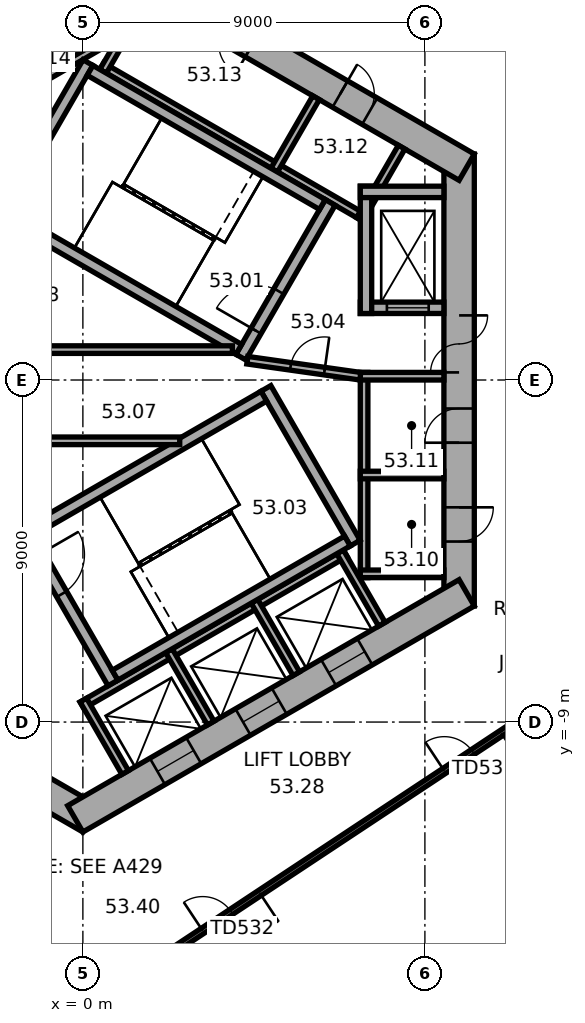
"""IFC4 building model, lengths in metres.
Left out: names, types, materials, properties, quantities, classifications, styles, units other than length and angle.
Written with IfcOpenShell. Run it as: python <this file> out.ifc"""

import sys

from ifc_helpers import new_model, si_unit, direction, frame, frame_2d, origin, place, context, subcontext, project, spatial, rectangle, extrude, element, fill, save


model = new_model("IFC4")
c1 = context("Model", 3, precision=1e-05, world=origin(), true_north=direction((0.0, 1.0)))
c2 = subcontext(c1, "Body", "Model", "MODEL_VIEW")
j1 = project(units=[si_unit("LENGTHUNIT", "METRE"), si_unit("PLANEANGLEUNIT", "RADIAN")], contexts=[c1])
p1 = place(None, origin())
s1 = spatial("IfcSite", under=j1, at=p1, CompositionType="ELEMENT")
p2 = place(p1, origin())
s2 = spatial("IfcBuilding", under=s1, at=p2, CompositionType="ELEMENT")
p3 = place(p2, frame((0.0, 0.0, 214.3)))
s3 = spatial("IfcBuildingStorey", under=s2, at=p3, CompositionType="ELEMENT", Elevation=214.3)
p4 = place(p3, frame((9.9, -5.947, 0.0), z_axis=(0.0, 0.0, 1.0), x_axis=(0.0, 1.0, 0.0)))
e1 = element("IfcWall", 1, at=p4, inside=s3, PredefinedType="SHEAR", context=c2, shape_type="SweptSolid", body=[
    extrude(rectangle(XDim=11.894, YDim=0.8, at=frame_2d((5.947, 0.0))), origin(), (0.0, 0.0, 1.0), 7.4),
])
p5 = place(p4, frame((6.147, 0.0, 0.0)))
e2 = element("IfcOpeningElement", 2, at=p5, cuts=e1, PredefinedType="OPENING", context=c2, shape_type="SweptSolid", body=[
    extrude(rectangle(XDim=1.5, YDim=2.1, at=frame_2d((0.75, 1.05))), frame((0.0, 0.41, 0.0), z_axis=(0.0, -1.0, 0.0), x_axis=(1.0, 0.0, 0.0)), (0.0, 0.0, 1.0), 0.82),
])
p6 = place(p4, frame((1.697, 0.0, 0.0)))
e3 = element("IfcOpeningElement", 3, at=p6, cuts=e1, PredefinedType="OPENING", context=c2, shape_type="SweptSolid", body=[
    extrude(rectangle(XDim=0.9, YDim=2.1, at=frame_2d((0.45, 1.05))), frame((0.0, 0.41, 0.0), z_axis=(0.0, -1.0, 0.0), x_axis=(1.0, 0.0, 0.0)), (0.0, 0.0, 1.0), 0.82),
])
p7 = place(p4, frame((4.297, 0.0, 0.0)))
e4 = element("IfcOpeningElement", 4, at=p7, cuts=e1, PredefinedType="OPENING", context=c2, shape_type="SweptSolid", body=[
    extrude(rectangle(XDim=0.9, YDim=2.1, at=frame_2d((0.45, 1.05))), frame((0.0, 0.41, 0.0), z_axis=(0.0, -1.0, 0.0), x_axis=(1.0, 0.0, 0.0)), (0.0, 0.0, 1.0), 0.82),
])
p8 = place(p3, frame((10.1, 5.6, 0.0), z_axis=(0.0, 0.0, 1.0), x_axis=(-0.866023897231, 0.500002609418, 0.0)))
e5 = element("IfcWall", 5, at=p8, inside=s3, PredefinedType="SHEAR", context=c2, shape_type="SweptSolid", body=[
    extrude(rectangle(XDim=11.894, YDim=0.8, at=frame_2d((5.947, 0.0))), origin(), (0.0, 0.0, 1.0), 7.4),
])
p9 = place(p8, frame((2.947, 0.0, 0.0)))
e6 = element("IfcOpeningElement", 6, at=p9, cuts=e5, PredefinedType="OPENING", context=c2, shape_type="SweptSolid", body=[
    extrude(rectangle(XDim=0.9, YDim=2.1, at=frame_2d((0.45, 1.05))), frame((0.0, 0.41, 0.0), z_axis=(0.0, -1.0, 0.0), x_axis=(1.0, 0.0, 0.0)), (0.0, 0.0, 1.0), 0.82),
])
p10 = place(p8, frame((6.497, 0.0, 0.0)))
e7 = element("IfcOpeningElement", 7, at=p10, cuts=e5, PredefinedType="OPENING", context=c2, shape_type="SweptSolid", body=[
    extrude(rectangle(XDim=0.9, YDim=2.1, at=frame_2d((0.45, 1.05))), frame((0.0, 0.41, 0.0), z_axis=(0.0, -1.0, 0.0), x_axis=(1.0, 0.0, 0.0)), (0.0, 0.0, 1.0), 0.82),
])
p11 = place(p3, frame((0.2, 11.547, 0.0), z_axis=(0.0, 0.0, 1.0), x_axis=(-0.866023897231, -0.500002609418, 0.0)))
e8 = element("IfcWall", 8, at=p11, inside=s3, PredefinedType="SHEAR", context=c2, shape_type="SweptSolid", body=[
    extrude(rectangle(XDim=11.894, YDim=0.8, at=frame_2d((5.947, 0.0))), origin(), (0.0, 0.0, 1.0), 7.4),
])
p12 = place(p11, frame((6.147, 0.0, 0.0)))
e9 = element("IfcOpeningElement", 9, at=p12, cuts=e8, PredefinedType="OPENING", context=c2, shape_type="SweptSolid", body=[
    extrude(rectangle(XDim=1.5, YDim=2.1, at=frame_2d((0.75, 1.05))), frame((0.0, 0.41, 0.0), z_axis=(0.0, -1.0, 0.0), x_axis=(1.0, 0.0, 0.0)), (0.0, 0.0, 1.0), 0.82),
])
p13 = place(p11, frame((1.697, 0.0, 0.0)))
e10 = element("IfcOpeningElement", 10, at=p13, cuts=e8, PredefinedType="OPENING", context=c2, shape_type="SweptSolid", body=[
    extrude(rectangle(XDim=0.9, YDim=2.1, at=frame_2d((0.45, 1.05))), frame((0.0, 0.41, 0.0), z_axis=(0.0, -1.0, 0.0), x_axis=(1.0, 0.0, 0.0)), (0.0, 0.0, 1.0), 0.82),
])
p14 = place(p11, frame((4.297, 0.0, 0.0)))
e11 = element("IfcOpeningElement", 11, at=p14, cuts=e8, PredefinedType="OPENING", context=c2, shape_type="SweptSolid", body=[
    extrude(rectangle(XDim=0.9, YDim=2.1, at=frame_2d((0.45, 1.05))), frame((0.0, 0.41, 0.0), z_axis=(0.0, -1.0, 0.0), x_axis=(1.0, 0.0, 0.0)), (0.0, 0.0, 1.0), 0.82),
])
p15 = place(p3, frame((-10.1, -5.6, 0.0), z_axis=(0.0, 0.0, 1.0), x_axis=(0.866023897231, -0.500002609418, 0.0)))
e12 = element("IfcWall", 12, at=p15, inside=s3, PredefinedType="SHEAR", context=c2, shape_type="SweptSolid", body=[
    extrude(rectangle(XDim=11.894, YDim=0.8, at=frame_2d((5.947, 0.0))), origin(), (0.0, 0.0, 1.0), 7.4),
])
p16 = place(p15, frame((6.147, 0.0, 0.0)))
e13 = element("IfcOpeningElement", 13, at=p16, cuts=e12, PredefinedType="OPENING", context=c2, shape_type="SweptSolid", body=[
    extrude(rectangle(XDim=1.5, YDim=2.1, at=frame_2d((0.75, 1.05))), frame((0.0, 0.41, 0.0), z_axis=(0.0, -1.0, 0.0), x_axis=(1.0, 0.0, 0.0)), (0.0, 0.0, 1.0), 0.82),
])
p17 = place(p15, frame((1.597, 0.0, 0.0)))
e14 = element("IfcOpeningElement", 14, at=p17, cuts=e12, PredefinedType="OPENING", context=c2, shape_type="SweptSolid", body=[
    extrude(rectangle(XDim=1.1, YDim=2.1, at=frame_2d((0.55, 1.05))), frame((0.0, 0.41, 0.0), z_axis=(0.0, -1.0, 0.0), x_axis=(1.0, 0.0, 0.0)), (0.0, 0.0, 1.0), 0.82),
])
p18 = place(p15, frame((4.197, 0.0, 0.0)))
e15 = element("IfcOpeningElement", 15, at=p18, cuts=e12, PredefinedType="OPENING", context=c2, shape_type="SweptSolid", body=[
    extrude(rectangle(XDim=1.1, YDim=2.1, at=frame_2d((0.55, 1.05))), frame((0.0, 0.41, 0.0), z_axis=(0.0, -1.0, 0.0), x_axis=(1.0, 0.0, 0.0)), (0.0, 0.0, 1.0), 0.82),
])
p19 = place(p3, frame((-0.2, -11.547, 0.0), z_axis=(0.0, 0.0, 1.0), x_axis=(0.866023897231, 0.500002609418, 0.0)))
e16 = element("IfcWall", 16, at=p19, inside=s3, PredefinedType="SHEAR", context=c2, shape_type="SweptSolid", body=[
    extrude(rectangle(XDim=11.894, YDim=0.8, at=frame_2d((5.947, 0.0))), origin(), (0.0, 0.0, 1.0), 7.4),
])
p20 = place(p19, frame((2.497, 0.0, 0.0)))
e17 = element("IfcOpeningElement", 17, at=p20, cuts=e16, PredefinedType="OPENING", context=c2, shape_type="SweptSolid", body=[
    extrude(rectangle(XDim=1.1, YDim=2.1, at=frame_2d((0.55, 1.05))), frame((0.0, 0.41, 0.0), z_axis=(0.0, -1.0, 0.0), x_axis=(1.0, 0.0, 0.0)), (0.0, 0.0, 1.0), 0.82),
])
p21 = place(p19, frame((5.097, 0.0, 0.0)))
e18 = element("IfcOpeningElement", 18, at=p21, cuts=e16, PredefinedType="OPENING", context=c2, shape_type="SweptSolid", body=[
    extrude(rectangle(XDim=1.1, YDim=2.1, at=frame_2d((0.55, 1.05))), frame((0.0, 0.41, 0.0), z_axis=(0.0, -1.0, 0.0), x_axis=(1.0, 0.0, 0.0)), (0.0, 0.0, 1.0), 0.82),
])
p22 = place(p19, frame((7.697, 0.0, 0.0)))
e19 = element("IfcOpeningElement", 19, at=p22, cuts=e16, PredefinedType="OPENING", context=c2, shape_type="SweptSolid", body=[
    extrude(rectangle(XDim=1.1, YDim=2.1, at=frame_2d((0.55, 1.05))), frame((0.0, 0.41, 0.0), z_axis=(0.0, -1.0, 0.0), x_axis=(1.0, 0.0, 0.0)), (0.0, 0.0, 1.0), 0.82),
])
p23 = place(p3, frame((13.44, -7.683, 0.0), z_axis=(0.0, 0.0, 1.0), x_axis=(-0.833878347594, -0.551948277844, 0.0)))
e20 = element("IfcWall", 20, at=p23, inside=s3, PredefinedType="STANDARD", context=c2, shape_type="SweptSolid", body=[
    extrude(rectangle(XDim=15.249, YDim=0.15, at=frame_2d((7.625, 0.0))), origin(), (0.0, 0.0, 1.0), 2.6),
])
p24 = place(p23, frame((2.912, 0.0, 0.0)))
e21 = element("IfcOpeningElement", 21, at=p24, cuts=e20, PredefinedType="OPENING", context=c2, shape_type="SweptSolid", body=[
    extrude(rectangle(XDim=1.8, YDim=2.4, at=frame_2d((0.9, 1.2))), frame((0.0, 0.085, 0.0), z_axis=(0.0, -1.0, 0.0), x_axis=(1.0, 0.0, 0.0)), (0.0, 0.0, 1.0), 0.17),
])
p25 = place(p23, frame((10.537, 0.0, 0.0)))
e22 = element("IfcOpeningElement", 22, at=p25, cuts=e20, PredefinedType="OPENING", context=c2, shape_type="SweptSolid", body=[
    extrude(rectangle(XDim=1.8, YDim=2.4, at=frame_2d((0.9, 1.2))), frame((0.0, 0.085, 0.0), z_axis=(0.0, -1.0, 0.0), x_axis=(1.0, 0.0, 0.0)), (0.0, 0.0, 1.0), 0.17),
])
p26 = place(p3, frame((0.69, -16.171, 0.0), z_axis=(0.0, 0.0, 1.0), x_axis=(-0.871655280677, 0.490119446326, 0.0)))
e23 = element("IfcWall", 23, at=p26, inside=s3, PredefinedType="STANDARD", context=c2, shape_type="SweptSolid", body=[
    extrude(rectangle(XDim=14.552, YDim=0.15, at=frame_2d((7.276, 0.0))), origin(), (0.0, 0.0, 1.0), 2.6),
])
p27 = place(p26, frame((2.738, 0.0, 0.0)))
e24 = element("IfcOpeningElement", 24, at=p27, cuts=e23, PredefinedType="OPENING", context=c2, shape_type="SweptSolid", body=[
    extrude(rectangle(XDim=1.8, YDim=2.4, at=frame_2d((0.9, 1.2))), frame((0.0, 0.085, 0.0), z_axis=(0.0, -1.0, 0.0), x_axis=(1.0, 0.0, 0.0)), (0.0, 0.0, 1.0), 0.17),
])
p28 = place(p26, frame((10.014, 0.0, 0.0)))
e25 = element("IfcOpeningElement", 25, at=p28, cuts=e23, PredefinedType="OPENING", context=c2, shape_type="SweptSolid", body=[
    extrude(rectangle(XDim=1.8, YDim=2.4, at=frame_2d((0.9, 1.2))), frame((0.0, 0.085, 0.0), z_axis=(0.0, -1.0, 0.0), x_axis=(1.0, 0.0, 0.0)), (0.0, 0.0, 1.0), 0.17),
])
p29 = place(p3, frame((7.4, -5.2, 0.0), z_axis=(0.0, 0.0, 1.0), x_axis=(0.0, 1.0, 0.0)))
e26 = element("IfcWall", 26, at=p29, inside=s3, PredefinedType="PARTITIONING", context=c2, shape_type="SweptSolid", body=[
    extrude(rectangle(XDim=5.4, YDim=0.2, at=frame_2d((2.7, 0.0))), origin(), (0.0, 0.0, 1.0), 7.12),
])
for number, where, z_axis, x_axis in (
    (27, (7.3, -5.1, 0.0), (0.0, 0.0, 1.0), (1.0, 0.0, 0.0)),
    (28, (7.3, -2.5, 0.0), (0.0, 0.0, 1.0), (1.0, 0.0, 0.0)),
    (29, (7.3, 0.1, 0.0), (0.0, 0.0, 1.0), (1.0, 0.0, 0.0)),
):
    element("IfcWall", number, at=place(p3, frame(where, z_axis=z_axis, x_axis=x_axis)), inside=s3, PredefinedType="PARTITIONING", context=c2, shape_type="SweptSolid", body=[
        extrude(rectangle(XDim=2.2, YDim=0.2, at=frame_2d((1.1, 0.0))), origin(), (0.0, 0.0, 1.0), 7.12),
    ])
p30 = place(p3, frame((7.424, 4.259, 0.0), z_axis=(0.0, 0.0, 1.0), x_axis=(-0.866026010844, 0.49999894854, 0.0)))
e30 = element("IfcWall", 30, at=p30, inside=s3, PredefinedType="PARTITIONING", context=c2, shape_type="SweptSolid", body=[
    extrude(rectangle(XDim=8.0, YDim=0.2, at=frame_2d((4.0, 0.0))), origin(), (0.0, 0.0, 1.0), 7.12),
])
for number, where, z_axis, x_axis in (
    (31, (7.287, 4.222, 0.0), (0.0, 0.0, 1.0), (0.5, 0.866, 0.0)),
    (32, (5.036, 5.522, 0.0), (0.0, 0.0, 1.0), (0.5, 0.866, 0.0)),
    (33, (0.532, 8.122, 0.0), (0.0, 0.0, 1.0), (0.5, 0.866, 0.0)),
):
    element("IfcWall", number, at=place(p3, frame(where, z_axis=z_axis, x_axis=x_axis)), inside=s3, PredefinedType="PARTITIONING", context=c2, shape_type="SweptSolid", body=[
        extrude(rectangle(XDim=2.2, YDim=0.2, at=frame_2d((1.1, 0.0))), origin(), (0.0, 0.0, 1.0), 7.12),
    ])
p31 = place(p3, frame((0.803, 9.009, 0.0), z_axis=(0.0, 0.0, 1.0), x_axis=(-0.866028230842, -0.499995103361, 0.0)))
e34 = element("IfcWall", 34, at=p31, inside=s3, PredefinedType="PARTITIONING", context=c2, shape_type="SweptSolid", body=[
    extrude(rectangle(XDim=5.4, YDim=0.2, at=frame_2d((2.7, 0.0))), origin(), (0.0, 0.0, 1.0), 7.12),
])
p32 = place(p3, frame((-0.024, -8.559, 0.0), z_axis=(0.0, 0.0, 1.0), x_axis=(0.866026010844, 0.49999894854, 0.0)))
e35 = element("IfcWall", 35, at=p32, inside=s3, PredefinedType="PARTITIONING", context=c2, shape_type="SweptSolid", body=[
    extrude(rectangle(XDim=8.0, YDim=0.2, at=frame_2d((4.0, 0.0))), origin(), (0.0, 0.0, 1.0), 7.12),
])
for number, where, z_axis, x_axis in (
    (36, (0.013, -8.422, 0.0), (0.0, 0.0, 1.0), (0.5, -0.866, 0.0)),
    (37, (2.264, -7.122, 0.0), (0.0, 0.0, 1.0), (0.5, -0.866, 0.0)),
    (38, (4.516, -5.822, 0.0), (0.0, 0.0, 1.0), (0.5, -0.866, 0.0)),
    (39, (6.768, -4.522, 0.0), (0.0, 0.0, 1.0), (0.5, -0.866, 0.0)),
):
    element("IfcWall", number, at=place(p3, frame(where, z_axis=z_axis, x_axis=x_axis)), inside=s3, PredefinedType="PARTITIONING", context=c2, shape_type="SweptSolid", body=[
        extrude(rectangle(XDim=2.2, YDim=0.2, at=frame_2d((1.1, 0.0))), origin(), (0.0, 0.0, 1.0), 7.12),
    ])
p33 = place(p3, frame((4.158, 0.602, 0.0), z_axis=(0.0, 0.0, 1.0), x_axis=(0.499977259774, 0.866038532462, 0.0)))
e40 = element("IfcWall", 40, at=p33, inside=s3, PredefinedType="SHEAR", context=c2, shape_type="SweptSolid", body=[
    extrude(rectangle(XDim=4.7, YDim=0.3, at=frame_2d((2.35, 0.0))), origin(), (0.0, 0.0, 1.0), 7.12),
])
p34 = place(p33, frame((0.8, 0.0, 0.0)))
e41 = element("IfcOpeningElement", 41, at=p34, cuts=e40, PredefinedType="OPENING", context=c2, shape_type="SweptSolid", body=[
    extrude(rectangle(XDim=1.2, YDim=2.1, at=frame_2d((0.6, 1.05))), frame((0.0, 0.16, 0.0), z_axis=(0.0, -1.0, 0.0), x_axis=(1.0, 0.0, 0.0)), (0.0, 0.0, 1.0), 0.32),
])
p35 = place(p3, frame((-2.216, 4.282, 0.0), z_axis=(0.0, 0.0, 1.0), x_axis=(0.499977259774, 0.866038532462, 0.0)))
e42 = element("IfcWall", 42, at=p35, inside=s3, PredefinedType="SHEAR", context=c2, shape_type="SweptSolid", body=[
    extrude(rectangle(XDim=4.7, YDim=0.3, at=frame_2d((2.35, 0.0))), origin(), (0.0, 0.0, 1.0), 7.12),
])
for number, where, z_axis, x_axis in (
    (43, (4.103, 0.807, 0.0), (0.0, 0.0, 1.0), (-0.866, 0.5, 0.0)),
    (44, (6.303, 4.617, 0.0), (0.0, 0.0, 1.0), (-0.866, 0.5, 0.0)),
):
    element("IfcWall", number, at=place(p3, frame(where, z_axis=z_axis, x_axis=x_axis)), inside=s3, PredefinedType="SHEAR", context=c2, shape_type="SweptSolid", body=[
        extrude(rectangle(XDim=7.06, YDim=0.3, at=frame_2d((3.53, 0.0))), origin(), (0.0, 0.0, 1.0), 7.12),
    ])
p36 = place(p3, frame((-1.558, -3.902, 0.0), z_axis=(0.0, 0.0, 1.0), x_axis=(0.499977259774, -0.866038532462, 0.0)))
e45 = element("IfcWall", 45, at=p36, inside=s3, PredefinedType="SHEAR", context=c2, shape_type="SweptSolid", body=[
    extrude(rectangle(XDim=4.7, YDim=0.3, at=frame_2d((2.35, 0.0))), origin(), (0.0, 0.0, 1.0), 7.12),
])
p37 = place(p36, frame((0.8, 0.0, 0.0)))
e46 = element("IfcOpeningElement", 46, at=p37, cuts=e45, PredefinedType="OPENING", context=c2, shape_type="SweptSolid", body=[
    extrude(rectangle(XDim=1.2, YDim=2.1, at=frame_2d((0.6, 1.05))), frame((0.0, 0.16, 0.0), z_axis=(0.0, -1.0, 0.0), x_axis=(1.0, 0.0, 0.0)), (0.0, 0.0, 1.0), 0.32),
])
p38 = place(p3, frame((4.816, -0.222, 0.0), z_axis=(0.0, 0.0, 1.0), x_axis=(0.499977259774, -0.866038532462, 0.0)))
e47 = element("IfcWall", 47, at=p38, inside=s3, PredefinedType="SHEAR", context=c2, shape_type="SweptSolid", body=[
    extrude(rectangle(XDim=4.7, YDim=0.3, at=frame_2d((2.35, 0.0))), origin(), (0.0, 0.0, 1.0), 7.12),
])
for number, where, z_axis, x_axis in (
    (48, (-1.353, -3.957, 0.0), (0.0, 0.0, 1.0), (0.866, 0.5, 0.0)),
    (49, (0.847, -7.767, 0.0), (0.0, 0.0, 1.0), (0.866, 0.5, 0.0)),
):
    element("IfcWall", number, at=place(p3, frame(where, z_axis=z_axis, x_axis=x_axis)), inside=s3, PredefinedType="SHEAR", context=c2, shape_type="SweptSolid", body=[
        extrude(rectangle(XDim=7.06, YDim=0.3, at=frame_2d((3.53, 0.0))), origin(), (0.0, 0.0, 1.0), 7.12),
    ])
p39 = place(p3, frame((7.3, 1.9, 0.0), z_axis=(0.0, 0.0, 1.0), x_axis=(1.0, 0.0, 0.0)))
e50 = element("IfcWall", 50, at=p39, inside=s3, PredefinedType="SHEAR", context=c2, shape_type="SweptSolid", body=[
    extrude(rectangle(XDim=2.2, YDim=0.3, at=frame_2d((1.1, 0.0))), origin(), (0.0, 0.0, 1.0), 7.12),
])
p40 = place(p39, frame((0.7, 0.0, 0.0)))
e51 = element("IfcOpeningElement", 51, at=p40, cuts=e50, PredefinedType="OPENING", context=c2, shape_type="SweptSolid", body=[
    extrude(rectangle(XDim=1.1, YDim=2.1, at=frame_2d((0.55, 1.05))), frame((0.0, 0.16, 0.0), z_axis=(0.0, -1.0, 0.0), x_axis=(1.0, 0.0, 0.0)), (0.0, 0.0, 1.0), 0.32),
])
p41 = place(p3, frame((7.45, 1.75, 0.0), z_axis=(0.0, 0.0, 1.0), x_axis=(0.0, 1.0, 0.0)))
e52 = element("IfcWall", 52, at=p41, inside=s3, PredefinedType="SHEAR", context=c2, shape_type="SweptSolid", body=[
    extrude(rectangle(XDim=3.35, YDim=0.3, at=frame_2d((1.675, 0.0))), origin(), (0.0, 0.0, 1.0), 7.12),
])
p42 = place(p3, frame((7.3, 4.95, 0.0), z_axis=(0.0, 0.0, 1.0), x_axis=(1.0, 0.0, 0.0)))
e53 = element("IfcWall", 53, at=p42, inside=s3, PredefinedType="SHEAR", context=c2, shape_type="SweptSolid", body=[
    extrude(rectangle(XDim=2.2, YDim=0.3, at=frame_2d((1.1, 0.0))), origin(), (0.0, 0.0, 1.0), 7.12),
])
p43 = place(p3, frame((4.327, 0.521, 0.0), z_axis=(0.0, 0.0, 1.0), x_axis=(0.990124376366, -0.14019172346, 0.0)))
e54 = element("IfcWall", 54, at=p43, inside=s3, PredefinedType="PARTITIONING", context=c2, shape_type="SweptSolid", body=[
    extrude(rectangle(XDim=3.002, YDim=0.2, at=frame_2d((1.501, 0.0))), origin(), (0.0, 0.0, 1.0), 7.12),
])
p44 = place(p43, frame((1.15, 0.0, 0.0)))
e55 = element("IfcOpeningElement", 55, at=p44, cuts=e54, PredefinedType="OPENING", context=c2, shape_type="SweptSolid", body=[
    extrude(rectangle(XDim=0.9, YDim=2.1, at=frame_2d((0.45, 1.05))), frame((0.0, 0.11, 0.0), z_axis=(0.0, -1.0, 0.0), x_axis=(1.0, 0.0, 0.0)), (0.0, 0.0, 1.0), 0.22),
])
p45 = place(p3, frame((-2.72, -1.6, 0.0), z_axis=(0.0, 0.0, 1.0), x_axis=(1.0, 0.0, 0.0)))
e56 = element("IfcWall", 56, at=p45, inside=s3, PredefinedType="PARTITIONING", context=c2, shape_type="SweptSolid", body=[
    extrude(rectangle(XDim=5.269, YDim=0.2, at=frame_2d((2.634, 0.0))), origin(), (0.0, 0.0, 1.0), 7.12),
])
p46 = place(p3, frame((-2.72, 0.8, 0.0), z_axis=(0.0, 0.0, 1.0), x_axis=(1.0, 0.0, 0.0)))
e57 = element("IfcWall", 57, at=p46, inside=s3, PredefinedType="PARTITIONING", context=c2, shape_type="SweptSolid", body=[
    extrude(rectangle(XDim=6.654, YDim=0.2, at=frame_2d((3.327, 0.0))), origin(), (0.0, 0.0, 1.0), 7.12),
])
p47 = place(p24, origin())
e58 = element("IfcDoor", 58, at=p47, inside=s3, OperationType="DOUBLE_DOOR_DOUBLE_SWING", PredefinedType="DOOR", context=c2, shape_type="SweptSolid", body=[
    extrude(rectangle(XDim=1.8, YDim=2.4, at=frame_2d((0.9, 1.2))), frame((0.0, 0.025, 0.0), z_axis=(0.0, -1.0, 0.0), x_axis=(1.0, 0.0, 0.0)), (0.0, 0.0, 1.0), 0.05),
])
fill(e21, e58)
p48 = place(p25, origin())
e59 = element("IfcDoor", 59, at=p48, inside=s3, OperationType="DOUBLE_DOOR_DOUBLE_SWING", PredefinedType="DOOR", context=c2, shape_type="SweptSolid", body=[
    extrude(rectangle(XDim=1.8, YDim=2.4, at=frame_2d((0.9, 1.2))), frame((0.0, 0.025, 0.0), z_axis=(0.0, -1.0, 0.0), x_axis=(1.0, 0.0, 0.0)), (0.0, 0.0, 1.0), 0.05),
])
fill(e22, e59)
p49 = place(p5, origin())
e60 = element("IfcDoor", 60, at=p49, inside=s3, OperationType="DOUBLE_DOOR_SINGLE_SWING", PredefinedType="DOOR", context=c2, shape_type="SweptSolid", body=[
    extrude(rectangle(XDim=1.5, YDim=2.1, at=frame_2d((0.75, 1.05))), frame((0.0, 0.025, 0.0), z_axis=(0.0, -1.0, 0.0), x_axis=(1.0, 0.0, 0.0)), (0.0, 0.0, 1.0), 0.05),
])
fill(e2, e60)
p50 = place(p34, origin())
e61 = element("IfcDoor", 61, at=p50, inside=s3, OperationType="SINGLE_SWING_RIGHT", PredefinedType="DOOR", context=c2, shape_type="SweptSolid", body=[
    extrude(rectangle(XDim=1.2, YDim=2.1, at=frame_2d((0.6, 1.05))), frame((0.0, 0.025, 0.0), z_axis=(0.0, -1.0, 0.0), x_axis=(1.0, 0.0, 0.0)), (0.0, 0.0, 1.0), 0.05),
])
fill(e41, e61)
p51 = place(p37, origin())
e62 = element("IfcDoor", 62, at=p51, inside=s3, OperationType="SINGLE_SWING_RIGHT", PredefinedType="DOOR", context=c2, shape_type="SweptSolid", body=[
    extrude(rectangle(XDim=1.2, YDim=2.1, at=frame_2d((0.6, 1.05))), frame((0.0, 0.025, 0.0), z_axis=(0.0, -1.0, 0.0), x_axis=(1.0, 0.0, 0.0)), (0.0, 0.0, 1.0), 0.05),
])
fill(e46, e62)
p52 = place(p44, origin())
e63 = element("IfcDoor", 63, at=p52, inside=s3, OperationType="SINGLE_SWING_LEFT", PredefinedType="DOOR", context=c2, shape_type="SweptSolid", body=[
    extrude(rectangle(XDim=0.9, YDim=2.1, at=frame_2d((0.45, 1.05))), frame((0.0, 0.025, 0.0), z_axis=(0.0, -1.0, 0.0), x_axis=(1.0, 0.0, 0.0)), (0.0, 0.0, 1.0), 0.05),
])
fill(e55, e63)
p53 = place(p6, origin())
e64 = element("IfcDoor", 64, at=p53, inside=s3, OperationType="SINGLE_SWING_LEFT", PredefinedType="DOOR", context=c2, shape_type="SweptSolid", body=[
    extrude(rectangle(XDim=0.9, YDim=2.1, at=frame_2d((0.45, 1.05))), frame((0.0, 0.025, 0.0), z_axis=(0.0, -1.0, 0.0), x_axis=(1.0, 0.0, 0.0)), (0.0, 0.0, 1.0), 0.05),
])
fill(e3, e64)
p54 = place(p7, origin())
e65 = element("IfcDoor", 65, at=p54, inside=s3, OperationType="SINGLE_SWING_LEFT", PredefinedType="DOOR", context=c2, shape_type="SweptSolid", body=[
    extrude(rectangle(XDim=0.9, YDim=2.1, at=frame_2d((0.45, 1.05))), frame((0.0, 0.025, 0.0), z_axis=(0.0, -1.0, 0.0), x_axis=(1.0, 0.0, 0.0)), (0.0, 0.0, 1.0), 0.05),
])
fill(e4, e65)
p55 = place(p9, origin())
e66 = element("IfcDoor", 66, at=p55, inside=s3, OperationType="SINGLE_SWING_LEFT", PredefinedType="DOOR", context=c2, shape_type="SweptSolid", body=[
    extrude(rectangle(XDim=0.9, YDim=2.1, at=frame_2d((0.45, 1.05))), frame((0.0, 0.025, 0.0), z_axis=(0.0, -1.0, 0.0), x_axis=(1.0, 0.0, 0.0)), (0.0, 0.0, 1.0), 0.05),
])
fill(e6, e66)
p56 = place(p40, origin())
e67 = element("IfcDoor", 67, at=p56, inside=s3, OperationType="DOUBLE_DOOR_SLIDING", PredefinedType="DOOR", context=c2, shape_type="SweptSolid", body=[
    extrude(rectangle(XDim=1.1, YDim=2.1, at=frame_2d((0.55, 1.05))), frame((0.0, 0.025, 0.0), z_axis=(0.0, -1.0, 0.0), x_axis=(1.0, 0.0, 0.0)), (0.0, 0.0, 1.0), 0.05),
])
fill(e51, e67)
p57 = place(p20, origin())
e68 = element("IfcDoor", 68, at=p57, inside=s3, OperationType="DOUBLE_DOOR_SLIDING", PredefinedType="DOOR", context=c2, shape_type="SweptSolid", body=[
    extrude(rectangle(XDim=1.1, YDim=2.1, at=frame_2d((0.55, 1.05))), frame((0.0, 0.025, 0.0), z_axis=(0.0, -1.0, 0.0), x_axis=(1.0, 0.0, 0.0)), (0.0, 0.0, 1.0), 0.05),
])
fill(e17, e68)
p58 = place(p21, origin())
e69 = element("IfcDoor", 69, at=p58, inside=s3, OperationType="DOUBLE_DOOR_SLIDING", PredefinedType="DOOR", context=c2, shape_type="SweptSolid", body=[
    extrude(rectangle(XDim=1.1, YDim=2.1, at=frame_2d((0.55, 1.05))), frame((0.0, 0.025, 0.0), z_axis=(0.0, -1.0, 0.0), x_axis=(1.0, 0.0, 0.0)), (0.0, 0.0, 1.0), 0.05),
])
fill(e18, e69)
p59 = place(p22, origin())
e70 = element("IfcDoor", 70, at=p59, inside=s3, OperationType="DOUBLE_DOOR_SLIDING", PredefinedType="DOOR", context=c2, shape_type="SweptSolid", body=[
    extrude(rectangle(XDim=1.1, YDim=2.1, at=frame_2d((0.55, 1.05))), frame((0.0, 0.025, 0.0), z_axis=(0.0, -1.0, 0.0), x_axis=(1.0, 0.0, 0.0)), (0.0, 0.0, 1.0), 0.05),
])
fill(e19, e70)
save(model, sys.argv[1])
